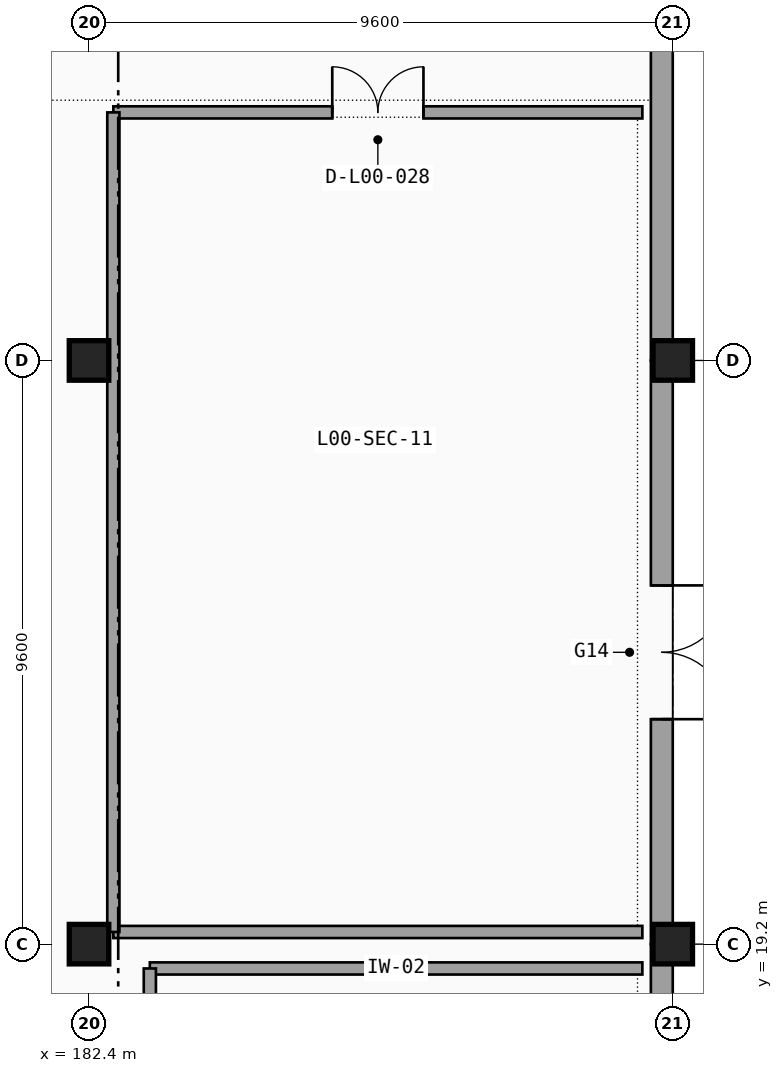
"""IFC4 building model, lengths in metres.
Left out: names, types, materials, properties, quantities, classifications, styles, units other than length and angle.
Written with IfcOpenShell. Run it as: python <this file> out.ifc"""

import sys

from ifc_helpers import new_model, si_unit, direction, frame, frame_2d, origin, origin_2d, place, context, subcontext, project, spatial, rectangle, extrude, element, fill, save


model = new_model("IFC4")
c1 = context("Model", 3, precision=1e-05, world=origin(), true_north=direction((0.0, 1.0)))
c2 = subcontext(c1, "Body", "Model", "MODEL_VIEW")
j1 = project(units=[si_unit("LENGTHUNIT", "METRE"), si_unit("PLANEANGLEUNIT", "RADIAN")], contexts=[c1])
p1 = place(None, origin())
s1 = spatial("IfcSite", under=j1, at=p1, CompositionType="ELEMENT")
p2 = place(p1, origin())
s2 = spatial("IfcBuilding", under=s1, at=p2, CompositionType="ELEMENT")
p3 = place(p2, origin())
s3 = spatial("IfcBuildingStorey", under=s2, at=p3, CompositionType="ELEMENT", Elevation=0.0)
for number, where, z_axis, x_axis in (
    (1, (182.4, 19.2, 0.0), (0.0, 0.0, 1.0), (1.0, 0.0, 0.0)),
    (2, (182.4, 28.8, 0.0), (0.0, 0.0, 1.0), (1.0, 0.0, 0.0)),
    (3, (192.0, 19.2, 0.0), (0.0, 0.0, 1.0), (1.0, 0.0, 0.0)),
    (4, (192.0, 28.8, 0.0), (0.0, 0.0, 1.0), (1.0, 0.0, 0.0)),
):
    element("IfcColumn", number, at=place(p3, frame(where, z_axis=z_axis, x_axis=x_axis)), inside=s3, PredefinedType="COLUMN", context=c2, shape_type="SweptSolid", body=[
        extrude(rectangle(XDim=0.65, YDim=0.65, at=origin_2d()), origin(), (0.0, 0.0, 1.0), 4.8),
    ])
p4 = place(p3, frame((191.82, 9.6, 0.0), z_axis=(0.0, 0.0, 1.0), x_axis=(0.0, 1.0, 0.0)))
e5 = element("IfcWall", 5, at=p4, inside=s3, PredefinedType="SOLIDWALL", context=c2, shape_type="SweptSolid", body=[
    extrude(rectangle(XDim=9.6, YDim=0.36, at=frame_2d((4.8, 0.0))), origin(), (0.0, 0.0, 1.0), 3.75),
])
p5 = place(p4, frame((5.9, 0.0, 0.0), z_axis=(0.0, 0.0, 1.0), x_axis=(-1.0, 0.0, 0.0)))
e6 = element("IfcOpeningElement", 6, at=p5, cuts=e5, PredefinedType="OPENING", context=c2, shape_type="SweptSolid", body=[
    extrude(rectangle(XDim=2.2, YDim=2.4, at=frame_2d((1.1, 1.2))), frame((0.0, 0.19, 0.0), z_axis=(0.0, -1.0, 0.0), x_axis=(1.0, 0.0, 0.0)), (0.0, 0.0, 1.0), 0.38),
])
p6 = place(p3, frame((191.82, 19.2, 0.0), z_axis=(0.0, 0.0, 1.0), x_axis=(0.0, 1.0, 0.0)))
e7 = element("IfcWall", 7, at=p6, inside=s3, PredefinedType="SOLIDWALL", context=c2, shape_type="SweptSolid", body=[
    extrude(rectangle(XDim=9.6, YDim=0.36, at=frame_2d((4.8, 0.0))), origin(), (0.0, 0.0, 1.0), 3.573),
])
p7 = place(p6, frame((5.9, 0.0, 0.0), z_axis=(0.0, 0.0, 1.0), x_axis=(-1.0, 0.0, 0.0)))
e8 = element("IfcOpeningElement", 8, at=p7, cuts=e7, PredefinedType="OPENING", context=c2, shape_type="SweptSolid", body=[
    extrude(rectangle(XDim=2.2, YDim=2.4, at=frame_2d((1.1, 1.2))), frame((0.0, 0.19, 0.0), z_axis=(0.0, -1.0, 0.0), x_axis=(1.0, 0.0, 0.0)), (0.0, 0.0, 1.0), 0.38),
])
p8 = place(p3, frame((191.82, 28.8, 0.0), z_axis=(0.0, 0.0, 1.0), x_axis=(0.0, 1.0, 0.0)))
e9 = element("IfcWall", 9, at=p8, inside=s3, PredefinedType="SOLIDWALL", context=c2, shape_type="SweptSolid", body=[
    extrude(rectangle(XDim=9.6, YDim=0.36, at=frame_2d((4.8, 0.0))), origin(), (0.0, 0.0, 1.0), 3.573),
])
p9 = place(p3, frame((183.4, 18.8, 0.0), z_axis=(0.0, 0.0, 1.0), x_axis=(1.0, 0.0, 0.0)))
e10 = element("IfcWall", 10, at=p9, inside=s3, PredefinedType="PARTITIONING", context=c2, shape_type="SweptSolid", body=[
    extrude(rectangle(XDim=8.1, YDim=0.2, at=frame_2d((4.05, 0.0))), origin(), (0.0, 0.0, 1.0), 4.5),
])
p10 = place(p3, frame((183.4, 7.6, 0.0), z_axis=(0.0, 0.0, 1.0), x_axis=(0.0, 1.0, 0.0)))
e11 = element("IfcWall", 11, at=p10, inside=s3, PredefinedType="PARTITIONING", context=c2, shape_type="SweptSolid", body=[
    extrude(rectangle(XDim=11.2, YDim=0.2, at=frame_2d((5.6, 0.0))), origin(), (0.0, 0.0, 1.0), 3.664),
])
p11 = place(p10, frame((6.05, 0.0, 0.0), z_axis=(0.0, 0.0, 1.0), x_axis=(1.0, 0.0, 0.0)))
e12 = element("IfcOpeningElement", 12, at=p11, cuts=e11, PredefinedType="OPENING", context=c2, shape_type="SweptSolid", body=[
    extrude(rectangle(XDim=1.5, YDim=2.25, at=frame_2d((0.75, 1.125))), frame((0.0, 0.11, 0.0), z_axis=(0.0, -1.0, 0.0), x_axis=(1.0, 0.0, 0.0)), (0.0, 0.0, 1.0), 0.22),
])
p12 = place(p3, frame((182.8, 32.88, 0.0), z_axis=(0.0, 0.0, 1.0), x_axis=(1.0, 0.0, 0.0)))
e13 = element("IfcWall", 13, at=p12, inside=s3, PredefinedType="PARTITIONING", context=c2, shape_type="SweptSolid", body=[
    extrude(rectangle(XDim=8.7, YDim=0.2, at=frame_2d((4.35, 0.0))), origin(), (0.0, 0.0, 1.0), 4.5),
])
p13 = place(p12, frame((3.6, 0.0, 0.0), z_axis=(0.0, 0.0, 1.0), x_axis=(1.0, 0.0, 0.0)))
e14 = element("IfcOpeningElement", 14, at=p13, cuts=e13, PredefinedType="OPENING", context=c2, shape_type="SweptSolid", body=[
    extrude(rectangle(XDim=1.5, YDim=2.25, at=frame_2d((0.75, 1.125))), frame((0.0, 0.11, 0.0), z_axis=(0.0, -1.0, 0.0), x_axis=(1.0, 0.0, 0.0)), (0.0, 0.0, 1.0), 0.22),
])
p14 = place(p3, frame((191.5, 19.4, 0.0), z_axis=(0.0, 0.0, 1.0), x_axis=(-1.0, 0.0, 0.0)))
e15 = element("IfcWall", 15, at=p14, inside=s3, PredefinedType="PARTITIONING", context=c2, shape_type="SweptSolid", body=[
    extrude(rectangle(XDim=8.7, YDim=0.2, at=frame_2d((4.35, 0.0))), origin(), (0.0, 0.0, 1.0), 3.75),
])
p15 = place(p3, frame((182.8, 19.4, 0.0), z_axis=(0.0, 0.0, 1.0), x_axis=(0.0, 1.0, 0.0)))
e16 = element("IfcWall", 16, at=p15, inside=s3, PredefinedType="PARTITIONING", context=c2, shape_type="SweptSolid", body=[
    extrude(rectangle(XDim=13.48, YDim=0.2, at=frame_2d((6.74, 0.0))), origin(), (0.0, 0.0, 1.0), 3.664),
])
p16 = place(p7, origin())
e17 = element("IfcDoor", 17, at=p16, inside=s3, OperationType="DOUBLE_DOOR_SINGLE_SWING", PredefinedType="DOOR", context=c2, shape_type="SweptSolid", body=[
    extrude(rectangle(XDim=2.2, YDim=2.4, at=frame_2d((1.1, 1.2))), frame((0.0, 0.025, 0.0), z_axis=(0.0, -1.0, 0.0), x_axis=(1.0, 0.0, 0.0)), (0.0, 0.0, 1.0), 0.05),
])
fill(e8, e17)
p17 = place(p13, origin())
e18 = element("IfcDoor", 18, at=p17, inside=s3, OperationType="DOUBLE_DOOR_SINGLE_SWING", PredefinedType="DOOR", context=c2, shape_type="SweptSolid", body=[
    extrude(rectangle(XDim=1.5, YDim=2.25, at=frame_2d((0.75, 1.125))), frame((0.0, 0.025, 0.0), z_axis=(0.0, -1.0, 0.0), x_axis=(1.0, 0.0, 0.0)), (0.0, 0.0, 1.0), 0.05),
])
fill(e14, e18)
save(model, sys.argv[1])
